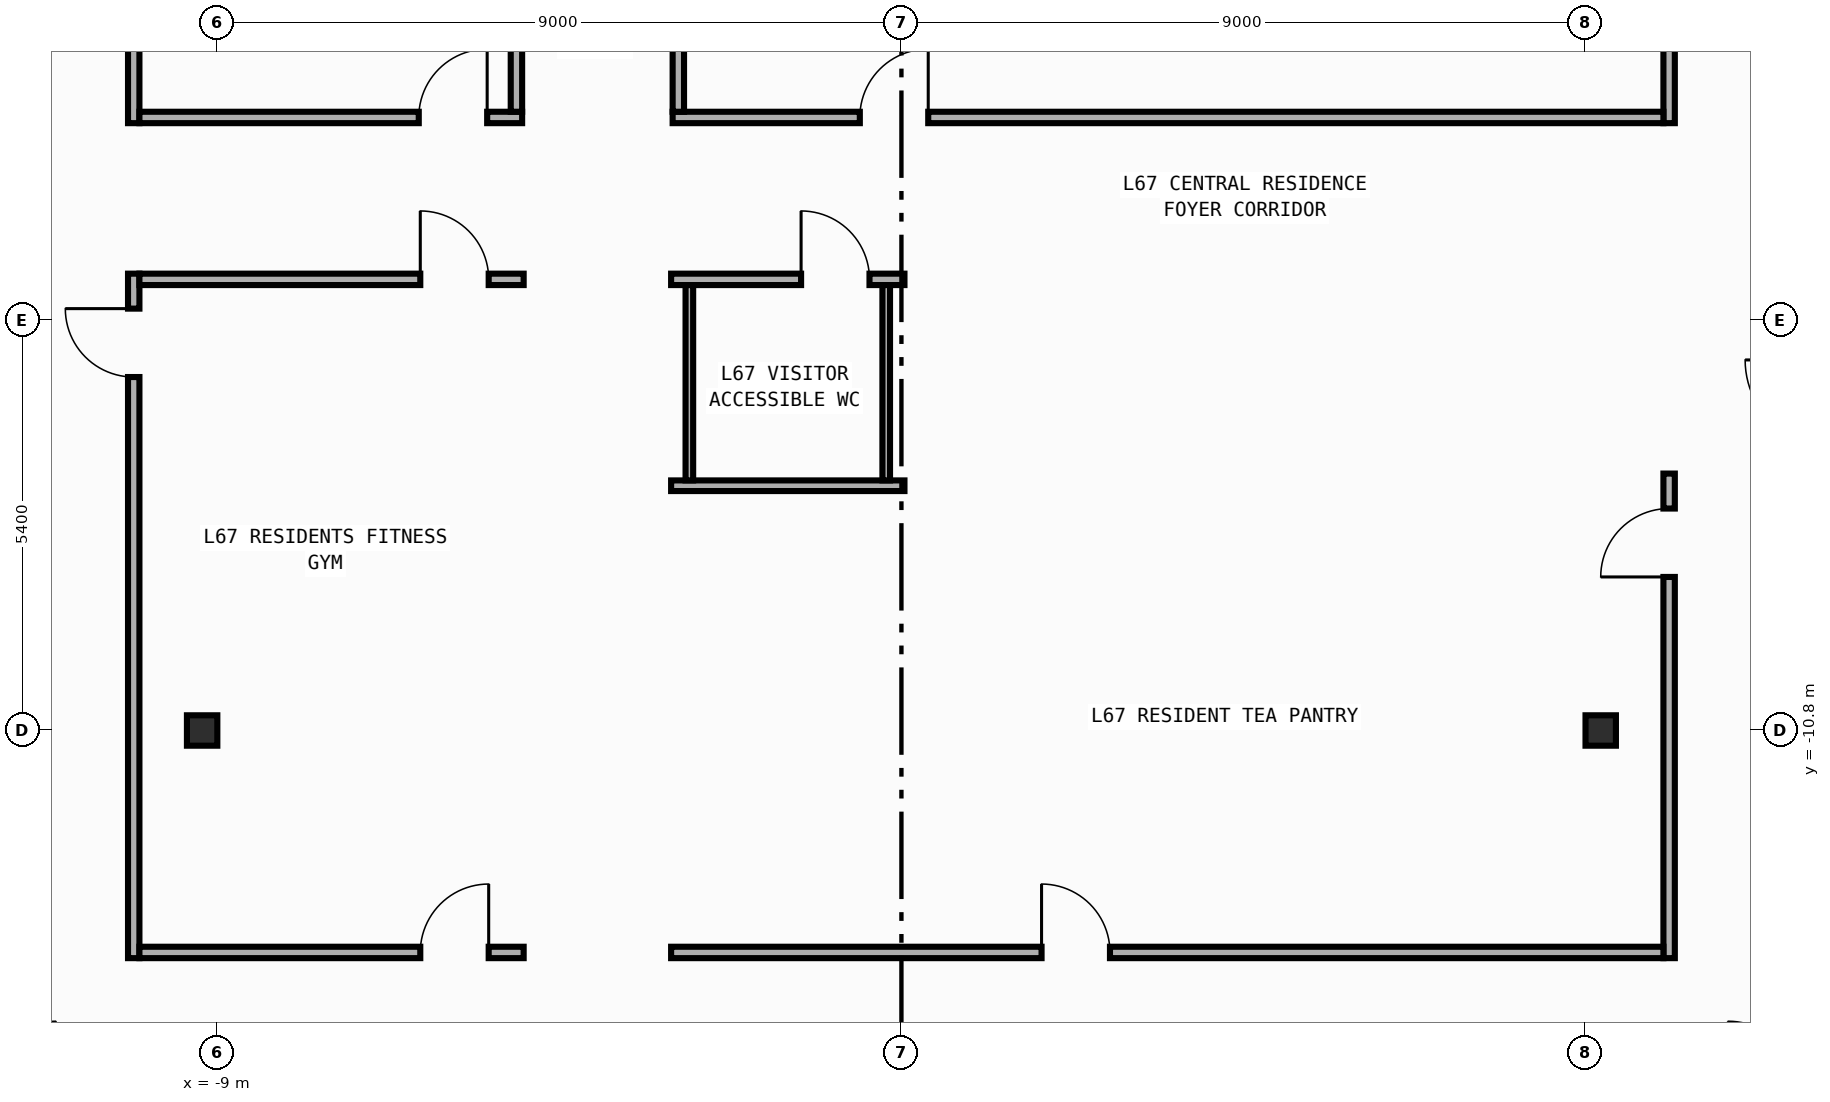
"""IFC4 building model, lengths in metres.
Left out: names, types, materials, properties, quantities, classifications, styles, units other than length and angle.
Written with IfcOpenShell. Run it as: python <this file> out.ifc"""

import sys

from ifc_helpers import new_model, si_unit, direction, frame, frame_2d, origin, origin_2d, place, context, subcontext, project, spatial, rectangle, i_section, extrude, element, fill, save


model = new_model("IFC4")
c1 = context("Model", 3, precision=1e-05, world=origin(), true_north=direction((0.0, 1.0)))
c2 = subcontext(c1, "Body", "Model", "MODEL_VIEW")
j1 = project(units=[si_unit("LENGTHUNIT", "METRE"), si_unit("PLANEANGLEUNIT", "RADIAN")], contexts=[c1])
p1 = place(None, origin())
s1 = spatial("IfcSite", under=j1, at=p1, CompositionType="ELEMENT")
p2 = place(p1, origin())
s2 = spatial("IfcBuilding", under=s1, at=p2, CompositionType="ELEMENT")
p3 = place(p2, frame((0.0, 0.0, 281.4)))
s3 = spatial("IfcBuildingStorey", under=s2, at=p3, CompositionType="ELEMENT", Elevation=281.4)
for number, where, z_axis, x_axis in (
    (1, (-9.2, -10.8, 0.0), (0.0, 0.0, 1.0), (1.0, 0.0, 0.0)),
    (2, (9.2, -10.8, 0.0), (0.0, 0.0, 1.0), (1.0, 0.0, 0.0)),
):
    element("IfcColumn", number, at=place(p3, frame(where, z_axis=z_axis, x_axis=x_axis)), inside=s3, PredefinedType="COLUMN", context=c2, shape_type="SweptSolid", body=[
        extrude(i_section(OverallWidth=0.4, OverallDepth=0.4, WebThickness=0.013, FlangeThickness=0.021, FilletRadius=0.022, at=origin_2d()), origin(), (0.0, 0.0, 1.0), 3.8),
    ])
p4 = place(p3, frame((-10.1, -2.81, 0.0), z_axis=(0.0, 0.0, 1.0), x_axis=(0.0, 1.0, 0.0)))
e3 = element("IfcWall", 3, at=p4, inside=s3, PredefinedType="PARTITIONING", context=c2, shape_type="SweptSolid", body=[
    extrude(rectangle(XDim=16.605, YDim=0.15, at=frame_2d((8.302, 0.0))), origin(), (0.0, 0.0, 1.0), 3.54),
])
p5 = place(p4, frame((7.751, 0.0, 0.0)))
e4 = element("IfcOpeningElement", 4, at=p5, cuts=e3, PredefinedType="OPENING", context=c2, shape_type="SweptSolid", body=[
    extrude(rectangle(XDim=0.9, YDim=2.15, at=frame_2d((0.45, 1.075))), frame((0.0, 0.085, 0.0), z_axis=(0.0, -1.0, 0.0), x_axis=(1.0, 0.0, 0.0)), (0.0, 0.0, 1.0), 0.17),
])
p6 = place(p3, frame((-10.1, -13.795, 0.0), z_axis=(0.0, 0.0, 1.0), x_axis=(0.0, 1.0, 0.0)))
e5 = element("IfcWall", 5, at=p6, inside=s3, PredefinedType="PARTITIONING", context=c2, shape_type="SweptSolid", body=[
    extrude(rectangle(XDim=9.005, YDim=0.15, at=frame_2d((4.502, 0.0))), origin(), (0.0, 0.0, 1.0), 3.54),
])
p7 = place(p6, frame((7.645, 0.0, 0.0)))
e6 = element("IfcOpeningElement", 6, at=p7, cuts=e5, PredefinedType="OPENING", context=c2, shape_type="SweptSolid", body=[
    extrude(rectangle(XDim=0.9, YDim=2.15, at=frame_2d((0.45, 1.075))), frame((0.0, 0.085, 0.0), z_axis=(0.0, -1.0, 0.0), x_axis=(1.0, 0.0, 0.0)), (0.0, 0.0, 1.0), 0.17),
])
p8 = place(p3, frame((10.1, -2.81, 0.0), z_axis=(0.0, 0.0, 1.0), x_axis=(0.0, 1.0, 0.0)))
e7 = element("IfcWall", 7, at=p8, inside=s3, PredefinedType="PARTITIONING", context=c2, shape_type="SweptSolid", body=[
    extrude(rectangle(XDim=16.69, YDim=0.15, at=frame_2d((8.345, 0.0))), origin(), (0.0, 0.0, 1.0), 3.54),
])
p9 = place(p8, frame((7.694, 0.0, 0.0)))
e8 = element("IfcOpeningElement", 8, at=p9, cuts=e7, PredefinedType="OPENING", context=c2, shape_type="SweptSolid", body=[
    extrude(rectangle(XDim=0.9, YDim=2.15, at=frame_2d((0.45, 1.075))), frame((0.0, 0.085, 0.0), z_axis=(0.0, -1.0, 0.0), x_axis=(1.0, 0.0, 0.0)), (0.0, 0.0, 1.0), 0.17),
])
p10 = place(p3, frame((10.1, -13.795, 0.0), z_axis=(0.0, 0.0, 1.0), x_axis=(0.0, 1.0, 0.0)))
e9 = element("IfcWall", 9, at=p10, inside=s3, PredefinedType="PARTITIONING", context=c2, shape_type="SweptSolid", body=[
    extrude(rectangle(XDim=6.375, YDim=0.15, at=frame_2d((3.188, 0.0))), origin(), (0.0, 0.0, 1.0), 3.54),
])
p11 = place(p10, frame((5.015, 0.0, 0.0)))
e10 = element("IfcOpeningElement", 10, at=p11, cuts=e9, PredefinedType="OPENING", context=c2, shape_type="SweptSolid", body=[
    extrude(rectangle(XDim=0.9, YDim=2.15, at=frame_2d((0.45, 1.075))), frame((0.0, 0.085, 0.0), z_axis=(0.0, -1.0, 0.0), x_axis=(1.0, 0.0, 0.0)), (0.0, 0.0, 1.0), 0.17),
])
p12 = place(p3, frame((-10.025, -2.735, 0.0), z_axis=(0.0, 0.0, 1.0), x_axis=(1.0, 0.0, 0.0)))
e11 = element("IfcWall", 11, at=p12, inside=s3, PredefinedType="PARTITIONING", context=c2, shape_type="SweptSolid", body=[
    extrude(rectangle(XDim=5.035, YDim=0.15, at=frame_2d((2.518, 0.0))), origin(), (0.0, 0.0, 1.0), 3.54),
])
p13 = place(p12, frame((3.675, 0.0, 0.0)))
e12 = element("IfcOpeningElement", 12, at=p13, cuts=e11, PredefinedType="OPENING", context=c2, shape_type="SweptSolid", body=[
    extrude(rectangle(XDim=0.9, YDim=2.15, at=frame_2d((0.45, 1.075))), frame((0.0, 0.085, 0.0), z_axis=(0.0, -1.0, 0.0), x_axis=(1.0, 0.0, 0.0)), (0.0, 0.0, 1.0), 0.17),
])
p14 = place(p3, frame((-10.025, -4.865, 0.0), z_axis=(0.0, 0.0, 1.0), x_axis=(1.0, 0.0, 0.0)))
e13 = element("IfcWall", 13, at=p14, inside=s3, PredefinedType="PARTITIONING", context=c2, shape_type="SweptSolid", body=[
    extrude(rectangle(XDim=5.055, YDim=0.15, at=frame_2d((2.527, 0.0))), origin(), (0.0, 0.0, 1.0), 3.54),
])
p15 = place(p14, frame((3.695, 0.0, 0.0)))
e14 = element("IfcOpeningElement", 14, at=p15, cuts=e13, PredefinedType="OPENING", context=c2, shape_type="SweptSolid", body=[
    extrude(rectangle(XDim=0.9, YDim=2.15, at=frame_2d((0.45, 1.075))), frame((0.0, 0.085, 0.0), z_axis=(0.0, -1.0, 0.0), x_axis=(1.0, 0.0, 0.0)), (0.0, 0.0, 1.0), 0.17),
])
p16 = place(p3, frame((-3.01, -2.735, 0.0), z_axis=(0.0, 0.0, 1.0), x_axis=(1.0, 0.0, 0.0)))
e15 = element("IfcWall", 15, at=p16, inside=s3, PredefinedType="PARTITIONING", context=c2, shape_type="SweptSolid", body=[
    extrude(rectangle(XDim=13.035, YDim=0.15, at=frame_2d((6.518, 0.0))), origin(), (0.0, 0.0, 1.0), 3.54),
])
p17 = place(p16, frame((2.463, 0.0, 0.0)))
e16 = element("IfcOpeningElement", 16, at=p17, cuts=e15, PredefinedType="OPENING", context=c2, shape_type="SweptSolid", body=[
    extrude(rectangle(XDim=0.9, YDim=2.15, at=frame_2d((0.45, 1.075))), frame((0.0, 0.085, 0.0), z_axis=(0.0, -1.0, 0.0), x_axis=(1.0, 0.0, 0.0)), (0.0, 0.0, 1.0), 0.17),
])
p18 = place(p3, frame((-3.03, -4.865, 0.0), z_axis=(0.0, 0.0, 1.0), x_axis=(1.0, 0.0, 0.0)))
e17 = element("IfcWall", 17, at=p18, inside=s3, PredefinedType="PARTITIONING", context=c2, shape_type="SweptSolid", body=[
    extrude(rectangle(XDim=3.07, YDim=0.15, at=frame_2d((1.535, 0.0))), origin(), (0.0, 0.0, 1.0), 3.54),
])
p19 = place(p18, frame((1.71, 0.0, 0.0)))
e18 = element("IfcOpeningElement", 18, at=p19, cuts=e17, PredefinedType="OPENING", context=c2, shape_type="SweptSolid", body=[
    extrude(rectangle(XDim=0.9, YDim=2.15, at=frame_2d((0.45, 1.075))), frame((0.0, 0.085, 0.0), z_axis=(0.0, -1.0, 0.0), x_axis=(1.0, 0.0, 0.0)), (0.0, 0.0, 1.0), 0.17),
])
p20 = place(p3, frame((-5.065, -2.66, 0.0), z_axis=(0.0, 0.0, 1.0), x_axis=(0.0, 1.0, 0.0)))
e19 = element("IfcWall", 19, at=p20, inside=s3, PredefinedType="PARTITIONING", context=c2, shape_type="SweptSolid", body=[
    extrude(rectangle(XDim=16.455, YDim=0.15, at=frame_2d((8.228, 0.0))), origin(), (0.0, 0.0, 1.0), 3.19),
])
p21 = place(p20, frame((7.677, 0.0, 0.0)))
e20 = element("IfcOpeningElement", 20, at=p21, cuts=e19, PredefinedType="OPENING", context=c2, shape_type="SweptSolid", body=[
    extrude(rectangle(XDim=0.9, YDim=2.15, at=frame_2d((0.45, 1.075))), frame((0.0, 0.085, 0.0), z_axis=(0.0, -1.0, 0.0), x_axis=(1.0, 0.0, 0.0)), (0.0, 0.0, 1.0), 0.17),
])
p22 = place(p3, frame((-2.935, -2.66, 0.0), z_axis=(0.0, 0.0, 1.0), x_axis=(0.0, 1.0, 0.0)))
e21 = element("IfcWall", 21, at=p22, inside=s3, PredefinedType="PARTITIONING", context=c2, shape_type="SweptSolid", body=[
    extrude(rectangle(XDim=16.455, YDim=0.15, at=frame_2d((8.228, 0.0))), origin(), (0.0, 0.0, 1.0), 3.54),
])
p23 = place(p22, frame((7.677, 0.0, 0.0)))
e22 = element("IfcOpeningElement", 22, at=p23, cuts=e21, PredefinedType="OPENING", context=c2, shape_type="SweptSolid", body=[
    extrude(rectangle(XDim=0.9, YDim=2.15, at=frame_2d((0.45, 1.075))), frame((0.0, 0.085, 0.0), z_axis=(0.0, -1.0, 0.0), x_axis=(1.0, 0.0, 0.0)), (0.0, 0.0, 1.0), 0.17),
])
p24 = place(p3, frame((-10.025, -13.72, 0.0), z_axis=(0.0, 0.0, 1.0), x_axis=(1.0, 0.0, 0.0)))
e23 = element("IfcWall", 23, at=p24, inside=s3, PredefinedType="PARTITIONING", context=c2, shape_type="SweptSolid", body=[
    extrude(rectangle(XDim=5.055, YDim=0.15, at=frame_2d((2.527, 0.0))), origin(), (0.0, 0.0, 1.0), 3.54),
])
p25 = place(p24, frame((3.695, 0.0, 0.0)))
e24 = element("IfcOpeningElement", 24, at=p25, cuts=e23, PredefinedType="OPENING", context=c2, shape_type="SweptSolid", body=[
    extrude(rectangle(XDim=0.9, YDim=2.15, at=frame_2d((0.45, 1.075))), frame((0.0, 0.085, 0.0), z_axis=(0.0, -1.0, 0.0), x_axis=(1.0, 0.0, 0.0)), (0.0, 0.0, 1.0), 0.17),
])
p26 = place(p3, frame((-3.03, -13.72, 0.0), z_axis=(0.0, 0.0, 1.0), x_axis=(1.0, 0.0, 0.0)))
e25 = element("IfcWall", 25, at=p26, inside=s3, PredefinedType="PARTITIONING", context=c2, shape_type="SweptSolid", body=[
    extrude(rectangle(XDim=13.055, YDim=0.15, at=frame_2d((6.527, 0.0))), origin(), (0.0, 0.0, 1.0), 3.54),
])
p27 = place(p26, frame((4.874, 0.0, 0.0)))
e26 = element("IfcOpeningElement", 26, at=p27, cuts=e25, PredefinedType="OPENING", context=c2, shape_type="SweptSolid", body=[
    extrude(rectangle(XDim=0.9, YDim=2.15, at=frame_2d((0.45, 1.075))), frame((0.0, 0.085, 0.0), z_axis=(0.0, -1.0, 0.0), x_axis=(1.0, 0.0, 0.0)), (0.0, 0.0, 1.0), 0.17),
])
p28 = place(p3, frame((-3.03, -7.58, 0.0), z_axis=(0.0, 0.0, 1.0), x_axis=(1.0, 0.0, 0.0)))
e27 = element("IfcWall", 27, at=p28, inside=s3, PredefinedType="PARTITIONING", context=c2, shape_type="SweptSolid", body=[
    extrude(rectangle(XDim=3.07, YDim=0.14, at=frame_2d((1.535, 0.0))), origin(), (0.0, 0.0, 1.0), 3.54),
])
for number, where, z_axis, x_axis in (
    (28, (-0.2, -4.94, 0.0), (0.0, 0.0, 1.0), (0.0, -1.0, 0.0)),
    (29, (-2.79, -7.51, 0.0), (0.0, 0.0, 1.0), (0.0, 1.0, 0.0)),
):
    element("IfcWall", number, at=place(p3, frame(where, z_axis=z_axis, x_axis=x_axis)), inside=s3, PredefinedType="PARTITIONING", context=c2, shape_type="SweptSolid", body=[
        extrude(rectangle(XDim=2.57, YDim=0.1, at=frame_2d((1.285, 0.0))), origin(), (0.0, 0.0, 1.0), 3.54),
    ])
p29 = place(p7, origin())
e30 = element("IfcDoor", 30, at=p29, inside=s3, OperationType="SINGLE_SWING_RIGHT", PredefinedType="DOOR", context=c2, shape_type="SweptSolid", body=[
    extrude(rectangle(XDim=0.9, YDim=2.15, at=frame_2d((0.45, 1.075))), frame((0.0, 0.025, 0.0), z_axis=(0.0, -1.0, 0.0), x_axis=(1.0, 0.0, 0.0)), (0.0, 0.0, 1.0), 0.05),
])
fill(e6, e30)
p30 = place(p11, origin())
e31 = element("IfcDoor", 31, at=p30, inside=s3, OperationType="SINGLE_SWING_LEFT", PredefinedType="DOOR", context=c2, shape_type="SweptSolid", body=[
    extrude(rectangle(XDim=0.9, YDim=2.15, at=frame_2d((0.45, 1.075))), frame((0.0, 0.025, 0.0), z_axis=(0.0, -1.0, 0.0), x_axis=(1.0, 0.0, 0.0)), (0.0, 0.0, 1.0), 0.05),
])
fill(e10, e31)
p31 = place(p13, origin())
e32 = element("IfcDoor", 32, at=p31, inside=s3, OperationType="SINGLE_SWING_RIGHT", PredefinedType="DOOR", context=c2, shape_type="SweptSolid", body=[
    extrude(rectangle(XDim=0.9, YDim=2.15, at=frame_2d((0.45, 1.075))), frame((0.0, 0.025, 0.0), z_axis=(0.0, -1.0, 0.0), x_axis=(1.0, 0.0, 0.0)), (0.0, 0.0, 1.0), 0.05),
])
fill(e12, e32)
p32 = place(p15, origin())
e33 = element("IfcDoor", 33, at=p32, inside=s3, OperationType="SINGLE_SWING_LEFT", PredefinedType="DOOR", context=c2, shape_type="SweptSolid", body=[
    extrude(rectangle(XDim=0.9, YDim=2.15, at=frame_2d((0.45, 1.075))), frame((0.0, 0.025, 0.0), z_axis=(0.0, -1.0, 0.0), x_axis=(1.0, 0.0, 0.0)), (0.0, 0.0, 1.0), 0.05),
])
fill(e14, e33)
p33 = place(p17, origin())
e34 = element("IfcDoor", 34, at=p33, inside=s3, OperationType="SINGLE_SWING_RIGHT", PredefinedType="DOOR", context=c2, shape_type="SweptSolid", body=[
    extrude(rectangle(XDim=0.9, YDim=2.15, at=frame_2d((0.45, 1.075))), frame((0.0, 0.025, 0.0), z_axis=(0.0, -1.0, 0.0), x_axis=(1.0, 0.0, 0.0)), (0.0, 0.0, 1.0), 0.05),
])
fill(e16, e34)
p34 = place(p19, origin())
e35 = element("IfcDoor", 35, at=p34, inside=s3, OperationType="SINGLE_SWING_LEFT", PredefinedType="DOOR", context=c2, shape_type="SweptSolid", body=[
    extrude(rectangle(XDim=0.9, YDim=2.15, at=frame_2d((0.45, 1.075))), frame((0.0, 0.025, 0.0), z_axis=(0.0, -1.0, 0.0), x_axis=(1.0, 0.0, 0.0)), (0.0, 0.0, 1.0), 0.05),
])
fill(e18, e35)
p35 = place(p25, origin())
e36 = element("IfcDoor", 36, at=p35, inside=s3, OperationType="SINGLE_SWING_RIGHT", PredefinedType="DOOR", context=c2, shape_type="SweptSolid", body=[
    extrude(rectangle(XDim=0.9, YDim=2.15, at=frame_2d((0.45, 1.075))), frame((0.0, 0.025, 0.0), z_axis=(0.0, -1.0, 0.0), x_axis=(1.0, 0.0, 0.0)), (0.0, 0.0, 1.0), 0.05),
])
fill(e24, e36)
p36 = place(p27, origin())
e37 = element("IfcDoor", 37, at=p36, inside=s3, OperationType="SINGLE_SWING_LEFT", PredefinedType="DOOR", context=c2, shape_type="SweptSolid", body=[
    extrude(rectangle(XDim=0.9, YDim=2.15, at=frame_2d((0.45, 1.075))), frame((0.0, 0.025, 0.0), z_axis=(0.0, -1.0, 0.0), x_axis=(1.0, 0.0, 0.0)), (0.0, 0.0, 1.0), 0.05),
])
fill(e26, e37)
save(model, sys.argv[1])
